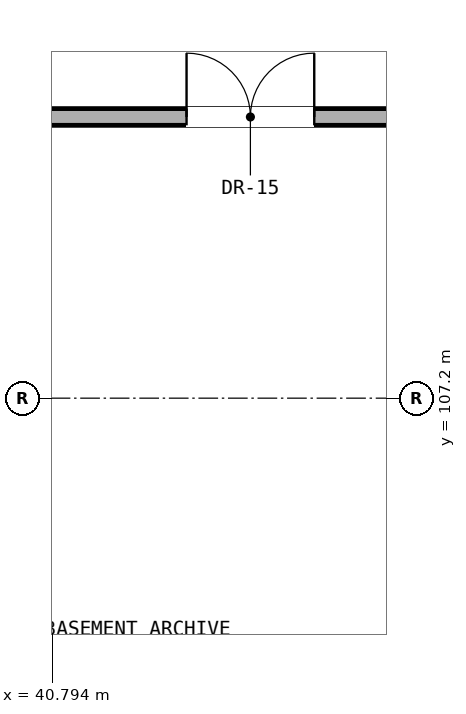
"""IFC4 building model, lengths in metres.
Left out: names, types, materials, properties, quantities, classifications, styles, units other than length and angle.
Written with IfcOpenShell. Run it as: python <this file> out.ifc"""

import sys

from ifc_helpers import new_model, si_unit, direction, frame, frame_2d, origin, place, context, subcontext, project, spatial, rectangle, extrude, element, fill, save


model = new_model("IFC4")
c1 = context("Model", 3, precision=1e-05, world=origin(), true_north=direction((0.0, 1.0)))
c2 = subcontext(c1, "Body", "Model", "MODEL_VIEW")
j1 = project(units=[si_unit("LENGTHUNIT", "METRE"), si_unit("PLANEANGLEUNIT", "RADIAN")], contexts=[c1])
p1 = place(None, origin())
s1 = spatial("IfcSite", under=j1, at=p1, CompositionType="ELEMENT")
p2 = place(p1, origin())
s2 = spatial("IfcBuilding", under=s1, at=p2, CompositionType="ELEMENT")
p3 = place(p2, frame((0.0, 0.0, -9.8)))
s3 = spatial("IfcBuildingStorey", under=s2, at=p3, CompositionType="ELEMENT", Elevation=-9.8)
p4 = place(p3, frame((29.2, 110.9, 0.0), z_axis=(0.0, 0.0, 1.0), x_axis=(1.0, 0.0, 0.0)))
e1 = element("IfcWall", 1, at=p4, inside=s3, PredefinedType="PARTITIONING", context=c2, shape_type="SweptSolid", body=[
    extrude(rectangle(XDim=28.4, YDim=0.22, at=frame_2d((14.2, 0.0))), origin(), (0.0, 0.0, 1.0), 4.97),
])
p5 = place(p4, frame((13.36, 0.0, 0.0)))
e2 = element("IfcOpeningElement", 2, at=p5, cuts=e1, PredefinedType="OPENING", context=c2, shape_type="SweptSolid", body=[
    extrude(rectangle(XDim=1.68, YDim=2.2, at=frame_2d((0.84, 1.1))), frame((0.0, 0.12, 0.0), z_axis=(0.0, -1.0, 0.0), x_axis=(1.0, 0.0, 0.0)), (0.0, 0.0, 1.0), 0.24),
])
p6 = place(p5, origin())
e3 = element("IfcDoor", 3, at=p6, inside=s3, OperationType="DOUBLE_DOOR_SINGLE_SWING", PredefinedType="DOOR", context=c2, shape_type="SweptSolid", body=[
    extrude(rectangle(XDim=1.68, YDim=2.2, at=frame_2d((0.84, 1.1))), frame((0.0, 0.025, 0.0), z_axis=(0.0, -1.0, 0.0), x_axis=(1.0, 0.0, 0.0)), (0.0, 0.0, 1.0), 0.05),
])
fill(e2, e3)
save(model, sys.argv[1])
